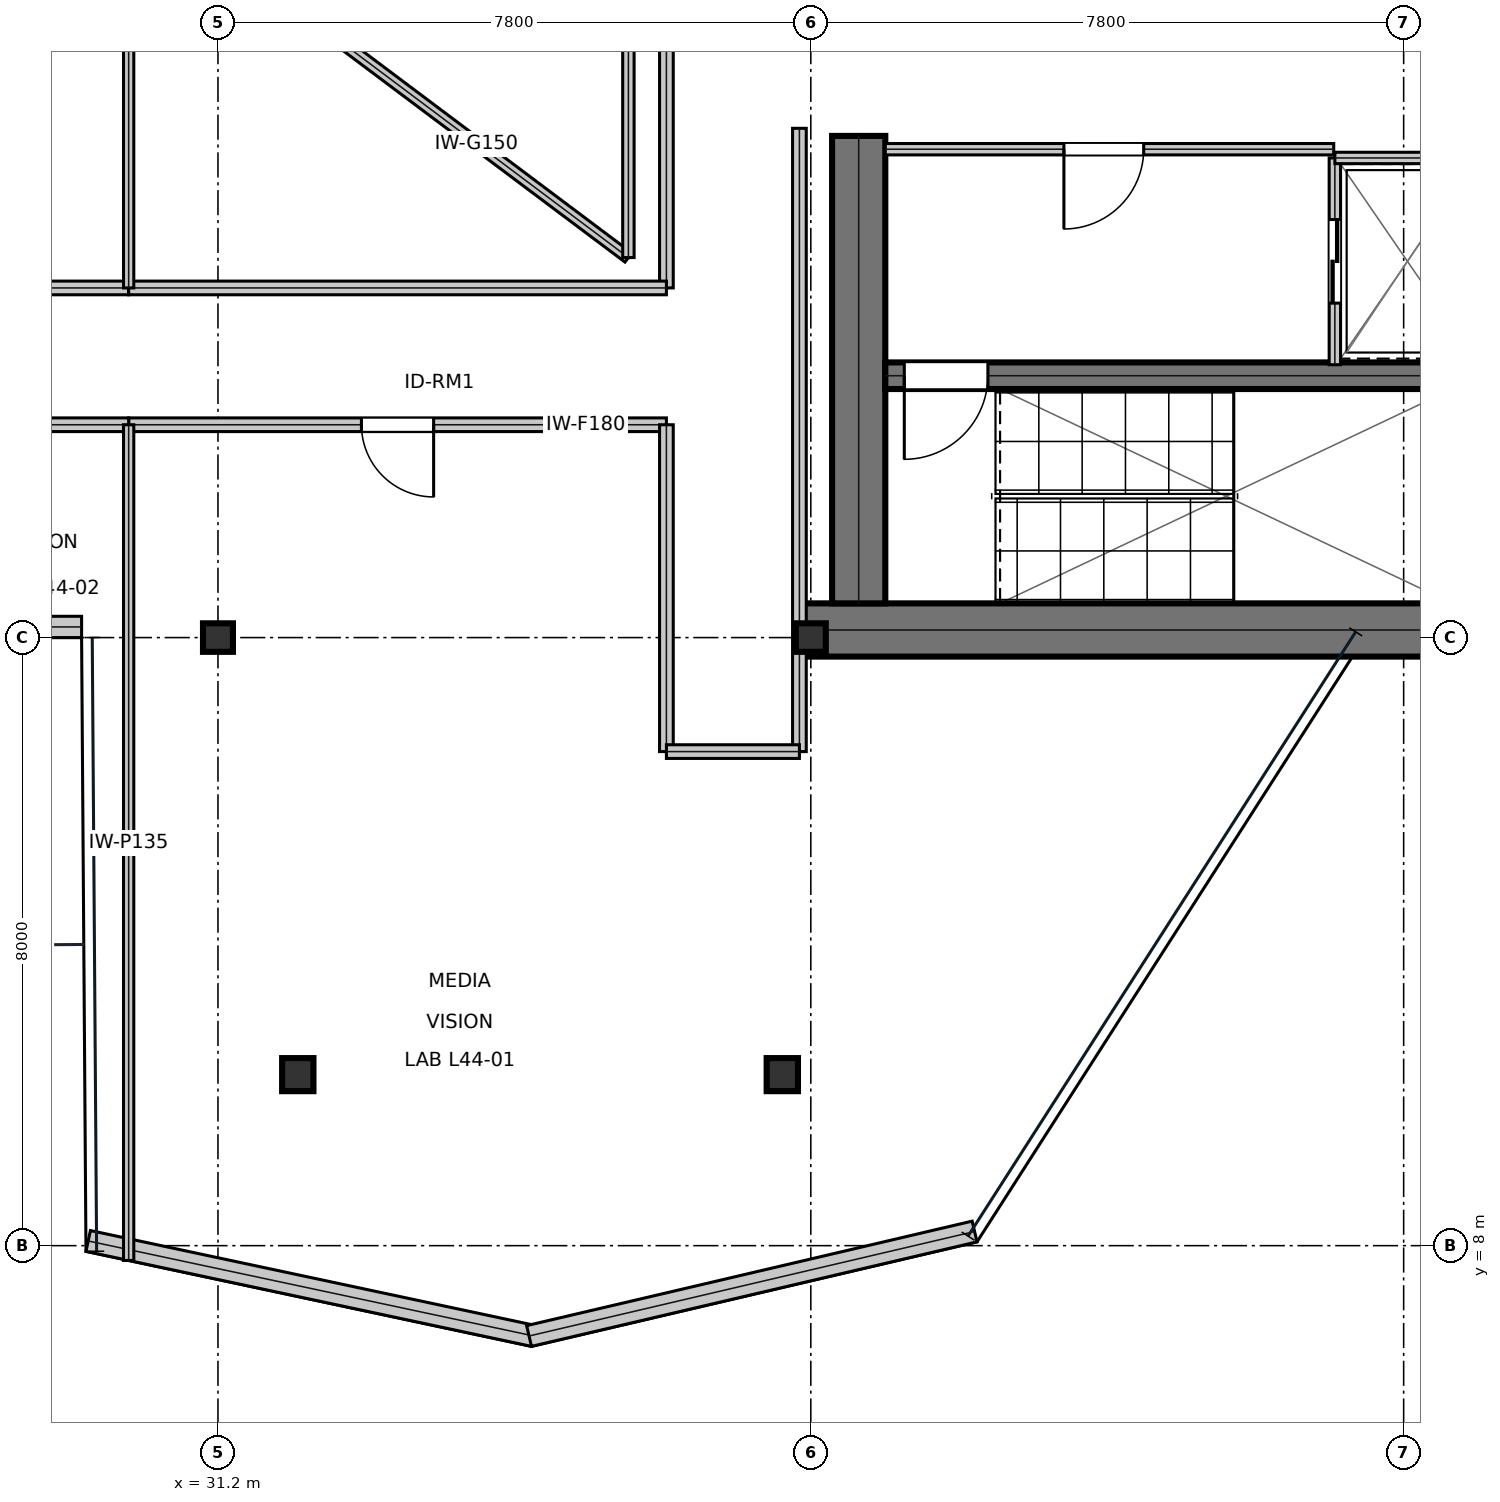
"""IFC4 building model, lengths in metres.
Left out: names, types, materials, properties, quantities, classifications, styles, units other than length and angle.
Written with IfcOpenShell. Run it as: python <this file> out.ifc"""

import sys

from ifc_helpers import new_model, si_unit, direction, frame, frame_2d, origin, origin_2d, place, context, subcontext, project, spatial, rectangle, i_section, extrude, element, fill, save


model = new_model("IFC4")
c1 = context("Model", 3, precision=1e-05, world=origin(), true_north=direction((0.0, 1.0)))
c2 = subcontext(c1, "Body", "Model", "MODEL_VIEW")
j1 = project(units=[si_unit("LENGTHUNIT", "METRE"), si_unit("PLANEANGLEUNIT", "RADIAN")], contexts=[c1])
p1 = place(None, origin())
s1 = spatial("IfcSite", under=j1, at=p1, CompositionType="ELEMENT")
p2 = place(p1, origin())
s2 = spatial("IfcBuilding", under=s1, at=p2, CompositionType="ELEMENT")
p3 = place(p2, frame((0.0, 0.0, 191.85)))
s3 = spatial("IfcBuildingStorey", under=s2, at=p3, CompositionType="ELEMENT", Elevation=191.85)
p4 = place(p3, frame((38.8, 16.1, 0.0), z_axis=(0.0, 0.0, 1.0), x_axis=(1.0, 0.0, 0.0)))
e1 = element("IfcWall", 1, at=p4, inside=s3, PredefinedType="SHEAR", context=c2, shape_type="SweptSolid", body=[
    extrude(rectangle(XDim=16.0, YDim=0.7, at=frame_2d((8.0, 0.0))), origin(), (0.0, 0.0, 1.0), 3.79),
])
p5 = place(p3, frame((39.63, 16.45, 0.0), z_axis=(0.0, 0.0, 1.0), x_axis=(0.0, 1.0, 0.0)))
e2 = element("IfcWall", 2, at=p5, inside=s3, PredefinedType="SHEAR", context=c2, shape_type="SweptSolid", body=[
    extrude(rectangle(XDim=6.15, YDim=0.7, at=frame_2d((3.075, 0.0))), origin(), (0.0, 0.0, 1.0), 3.79),
])
p6 = place(p3, frame((39.98, 19.445, 0.0), z_axis=(0.0, 0.0, 1.0), x_axis=(1.0, 0.0, 0.0)))
e3 = element("IfcWall", 3, at=p6, inside=s3, PredefinedType="SHEAR", context=c2, shape_type="SweptSolid", body=[
    extrude(rectangle(XDim=7.71, YDim=0.35, at=frame_2d((3.855, 0.0))), origin(), (0.0, 0.0, 1.0), 3.79),
])
p7 = place(p6, frame((0.25, 0.0, 0.0)))
e4 = element("IfcOpeningElement", 4, at=p7, cuts=e3, PredefinedType="OPENING", context=c2, shape_type="SweptSolid", body=[
    extrude(rectangle(XDim=1.1, YDim=2.15, at=frame_2d((0.55, 1.075))), frame((0.0, 0.185, 0.0), z_axis=(0.0, -1.0, 0.0), x_axis=(1.0, 0.0, 0.0)), (0.0, 0.0, 1.0), 0.37),
])
for number, where, z_axis, x_axis in (
    (5, (31.2, 16.0, 0.0), (0.0, 0.0, 1.0), (1.0, 0.0, 0.0)),
    (6, (39.0, 16.0, 0.0), (0.0, 0.0, 1.0), (1.0, 0.0, 0.0)),
):
    element("IfcColumn", number, at=place(p3, frame(where, z_axis=z_axis, x_axis=x_axis)), inside=s3, PredefinedType="COLUMN", context=c2, shape_type="SweptSolid", body=[
        extrude(i_section(OverallWidth=0.394, OverallDepth=0.375, WebThickness=0.017, FlangeThickness=0.028, at=origin_2d()), origin(), (0.0, 0.0, 1.0), 4.044),
    ])
for number, where, z_axis, x_axis in (
    (7, (32.25, 10.25, 0.016), (0.0, 0.0, 1.0), (1.0, 0.0, 0.0)),
    (8, (38.625, 10.25, 0.016), (0.0, 0.0, 1.0), (1.0, 0.0, 0.0)),
):
    element("IfcColumn", number, at=place(p3, frame(where, z_axis=z_axis, x_axis=x_axis)), inside=s3, PredefinedType="COLUMN", context=c2, shape_type="SweptSolid", body=[
        extrude(i_section(OverallWidth=0.412, OverallDepth=0.435, WebThickness=0.036, FlangeThickness=0.058, at=origin_2d()), origin(), (0.0, 0.0, 1.0), 4.018),
    ])
p8 = place(p3, frame((26.6, 16.14, 0.0), z_axis=(0.0, 0.0, 1.0), x_axis=(1.0, 0.0, 0.0)))
e9 = element("IfcWall", 9, at=p8, inside=s3, PredefinedType="STANDARD", context=c2, shape_type="SweptSolid", body=[
    extrude(rectangle(XDim=2.806, YDim=0.28, at=frame_2d((1.403, 0.0))), origin(), (0.0, 0.0, 1.0), 3.79),
])
p9 = place(p3, frame((29.492, 8.062, 0.0), z_axis=(0.0, 0.0, 1.0), x_axis=(0.978010564176, -0.208555355626, 0.0)))
e10 = element("IfcWall", 10, at=p9, inside=s3, PredefinedType="STANDARD", context=c2, shape_type="SweptSolid", body=[
    extrude(rectangle(XDim=5.994, YDim=0.28, at=frame_2d((2.997, 0.0))), origin(), (0.0, 0.0, 1.0), 3.79),
])
p10 = place(p3, frame((35.293, 6.811, 0.0), z_axis=(0.0, 0.0, 1.0), x_axis=(0.973574347184, 0.228370292517, 0.0)))
e11 = element("IfcWall", 11, at=p10, inside=s3, PredefinedType="STANDARD", context=c2, shape_type="SweptSolid", body=[
    extrude(rectangle(XDim=6.021, YDim=0.28, at=frame_2d((3.01, 0.0))), origin(), (0.0, 0.0, 1.0), 3.79),
])
p11 = place(p3, frame((39.98, 22.425, 0.0), z_axis=(0.0, 0.0, 1.0), x_axis=(1.0, 0.0, 0.0)))
e12 = element("IfcWall", 12, at=p11, inside=s3, PredefinedType="PARTITIONING", context=c2, shape_type="SweptSolid", body=[
    extrude(rectangle(XDim=5.9, YDim=0.15, at=frame_2d((2.95, 0.0))), origin(), (0.0, 0.0, 1.0), 3.79),
])
p12 = place(p11, frame((2.35, 0.0, 0.0)))
e13 = element("IfcOpeningElement", 13, at=p12, cuts=e12, PredefinedType="OPENING", context=c2, shape_type="SweptSolid", body=[
    extrude(rectangle(XDim=1.05, YDim=2.15, at=frame_2d((0.525, 1.075))), frame((0.0, 0.085, 0.0), z_axis=(0.0, -1.0, 0.0), x_axis=(1.0, 0.0, 0.0)), (0.0, 0.0, 1.0), 0.17),
])
p13 = place(p3, frame((45.895, 19.59, 0.0), z_axis=(0.0, 0.0, 1.0), x_axis=(0.0, 1.0, 0.0)))
e14 = element("IfcWall", 14, at=p13, inside=s3, PredefinedType="PARTITIONING", context=c2, shape_type="SweptSolid", body=[
    extrude(rectangle(XDim=2.72, YDim=0.15, at=frame_2d((1.36, 0.0))), origin(), (0.0, 0.0, 1.0), 3.79),
])
p14 = place(p13, frame((0.81, 0.0, 0.0)))
e15 = element("IfcOpeningElement", 15, at=p14, cuts=e14, PredefinedType="OPENING", context=c2, shape_type="SweptSolid", body=[
    extrude(rectangle(XDim=1.1, YDim=2.15, at=frame_2d((0.55, 1.075))), frame((0.0, 0.085, 0.0), z_axis=(0.0, -1.0, 0.0), x_axis=(1.0, 0.0, 0.0)), (0.0, 0.0, 1.0), 0.17),
])
p15 = place(p3, frame((45.895, 22.31, 0.0), z_axis=(0.0, 0.0, 1.0), x_axis=(1.0, 0.0, 0.0)))
e16 = element("IfcWall", 16, at=p15, inside=s3, PredefinedType="PARTITIONING", context=c2, shape_type="SweptSolid", body=[
    extrude(rectangle(XDim=1.915, YDim=0.15, at=frame_2d((0.958, 0.0))), origin(), (0.0, 0.0, 1.0), 3.79),
])
p16 = place(p3, frame((30.025, 18.8, 0.0), z_axis=(0.0, 0.0, 1.0), x_axis=(1.0, 0.0, 0.0)))
e17 = element("IfcWall", 17, at=p16, inside=s3, PredefinedType="SOLIDWALL", context=c2, shape_type="SweptSolid", body=[
    extrude(rectangle(XDim=7.075, YDim=0.18, at=frame_2d((3.538, 0.0))), origin(), (0.0, 0.0, 1.0), 3.241),
])
p17 = place(p16, frame((3.062, 0.0, 0.0)))
e18 = element("IfcOpeningElement", 18, at=p17, cuts=e17, PredefinedType="OPENING", context=c2, shape_type="SweptSolid", body=[
    extrude(rectangle(XDim=0.95, YDim=2.15, at=frame_2d((0.475, 1.075))), frame((0.0, 0.1, 0.0), z_axis=(0.0, -1.0, 0.0), x_axis=(1.0, 0.0, 0.0)), (0.0, 0.0, 1.0), 0.2),
])
p18 = place(p3, frame((26.4, 18.8, 0.0), z_axis=(0.0, 0.0, 1.0), x_axis=(1.0, 0.0, 0.0)))
e19 = element("IfcWall", 19, at=p18, inside=s3, PredefinedType="SOLIDWALL", context=c2, shape_type="SweptSolid", body=[
    extrude(rectangle(XDim=3.625, YDim=0.18, at=frame_2d((1.812, 0.0))), origin(), (0.0, 0.0, 1.0), 3.79),
])
p19 = place(p18, frame((1.337, 0.0, 0.0)))
e20 = element("IfcOpeningElement", 20, at=p19, cuts=e19, PredefinedType="OPENING", context=c2, shape_type="SweptSolid", body=[
    extrude(rectangle(XDim=0.95, YDim=2.15, at=frame_2d((0.475, 1.075))), frame((0.0, 0.1, 0.0), z_axis=(0.0, -1.0, 0.0), x_axis=(1.0, 0.0, 0.0)), (0.0, 0.0, 1.0), 0.2),
])
p20 = place(p3, frame((37.1, 20.6, 0.0), z_axis=(0.0, 0.0, 1.0), x_axis=(0.0, 1.0, 0.0)))
e21 = element("IfcWall", 21, at=p20, inside=s3, PredefinedType="SOLIDWALL", context=c2, shape_type="SweptSolid", body=[
    extrude(rectangle(XDim=12.9, YDim=0.18, at=frame_2d((6.45, 0.0))), origin(), (0.0, 0.0, 1.0), 3.241),
])
p21 = place(p20, frame((7.415, 0.0, 0.0)))
e22 = element("IfcOpeningElement", 22, at=p21, cuts=e21, PredefinedType="OPENING", context=c2, shape_type="SweptSolid", body=[
    extrude(rectangle(XDim=0.95, YDim=2.15, at=frame_2d((0.475, 1.075))), frame((0.0, 0.1, 0.0), z_axis=(0.0, -1.0, 0.0), x_axis=(1.0, 0.0, 0.0)), (0.0, 0.0, 1.0), 0.2),
])
p22 = place(p3, frame((38.85, 14.5, 0.0), z_axis=(0.0, 0.0, 1.0), x_axis=(0.0, 1.0, 0.0)))
e23 = element("IfcWall", 23, at=p22, inside=s3, PredefinedType="SOLIDWALL", context=c2, shape_type="SweptSolid", body=[
    extrude(rectangle(XDim=8.2, YDim=0.18, at=frame_2d((4.1, 0.0))), origin(), (0.0, 0.0, 1.0), 3.241),
])
p23 = place(p3, frame((37.1, 14.5, 0.0), z_axis=(0.0, 0.0, 1.0), x_axis=(0.0, 1.0, 0.0)))
e24 = element("IfcWall", 24, at=p23, inside=s3, PredefinedType="SOLIDWALL", context=c2, shape_type="SweptSolid", body=[
    extrude(rectangle(XDim=4.3, YDim=0.18, at=frame_2d((2.15, 0.0))), origin(), (0.0, 0.0, 1.0), 3.241),
])
p24 = place(p3, frame((37.1, 14.5, 0.0), z_axis=(0.0, 0.0, 1.0), x_axis=(1.0, 0.0, 0.0)))
e25 = element("IfcWall", 25, at=p24, inside=s3, PredefinedType="SOLIDWALL", context=c2, shape_type="SweptSolid", body=[
    extrude(rectangle(XDim=1.75, YDim=0.18, at=frame_2d((0.875, 0.0))), origin(), (0.0, 0.0, 1.0), 3.241),
])
p25 = place(p3, frame((26.4, 20.6, 0.0), z_axis=(0.0, 0.0, 1.0), x_axis=(1.0, 0.0, 0.0)))
e26 = element("IfcWall", 26, at=p25, inside=s3, PredefinedType="SOLIDWALL", context=c2, shape_type="SweptSolid", body=[
    extrude(rectangle(XDim=3.625, YDim=0.18, at=frame_2d((1.812, 0.0))), origin(), (0.0, 0.0, 1.0), 3.79),
])
p26 = place(p3, frame((30.025, 20.6, 0.0), z_axis=(0.0, 0.0, 1.0), x_axis=(1.0, 0.0, 0.0)))
e27 = element("IfcWall", 27, at=p26, inside=s3, PredefinedType="SOLIDWALL", context=c2, shape_type="SweptSolid", body=[
    extrude(rectangle(XDim=7.075, YDim=0.18, at=frame_2d((3.538, 0.0))), origin(), (0.0, 0.0, 1.0), 3.241),
])
p27 = place(p3, frame((30.025, 7.805, 0.0), z_axis=(0.0, 0.0, 1.0), x_axis=(0.0, 1.0, 0.0)))
e28 = element("IfcWall", 28, at=p27, inside=s3, PredefinedType="PARTITIONING", context=c2, shape_type="SweptSolid", body=[
    extrude(rectangle(XDim=10.995, YDim=0.135, at=frame_2d((5.498, 0.0))), origin(), (0.0, 0.0, 1.0), 3.319),
])
p28 = place(p3, frame((30.025, 20.6, 0.0), z_axis=(0.0, 0.0, 1.0), x_axis=(0.0, 1.0, 0.0)))
e29 = element("IfcWall", 29, at=p28, inside=s3, PredefinedType="PARTITIONING", context=c2, shape_type="SweptSolid", body=[
    extrude(rectangle(XDim=19.595, YDim=0.135, at=frame_2d((9.797, 0.0))), origin(), (0.0, 0.0, 1.0), 3.241),
])
p29 = place(p3, frame((32.6, 24.0, 0.0), z_axis=(0.0, 0.0, 1.0), x_axis=(0.8, -0.6, 0.0)))
e30 = element("IfcWall", 30, at=p29, inside=s3, PredefinedType="MOVABLE", context=c2, shape_type="SweptSolid", body=[
    extrude(rectangle(XDim=5.0, YDim=0.15, at=frame_2d((2.5, 0.0))), origin(), (0.0, 0.0, 1.0), 3.79),
])
p30 = place(p3, frame((36.6, 21.0, 0.0), z_axis=(0.0, 0.0, 1.0), x_axis=(0.0, 1.0, 0.0)))
e31 = element("IfcWall", 31, at=p30, inside=s3, PredefinedType="MOVABLE", context=c2, shape_type="SweptSolid", body=[
    extrude(rectangle(XDim=6.0, YDim=0.15, at=frame_2d((3.0, 0.0))), origin(), (0.0, 0.0, 1.0), 3.79),
])
p31 = place(p12, frame((1.05, 0.0, 0.0), z_axis=(0.0, 0.0, 1.0), x_axis=(-1.0, 0.0, 0.0)))
e32 = element("IfcDoor", 32, at=p31, inside=s3, OperationType="SINGLE_SWING_RIGHT", PredefinedType="DOOR", context=c2, shape_type="SweptSolid", body=[
    extrude(rectangle(XDim=1.05, YDim=2.15, at=frame_2d((0.525, 1.075))), frame((0.0, 0.025, 0.0), z_axis=(0.0, -1.0, 0.0), x_axis=(1.0, 0.0, 0.0)), (0.0, 0.0, 1.0), 0.05),
])
fill(e13, e32)
p32 = place(p14, frame((1.1, 0.0, 0.0), z_axis=(0.0, 0.0, 1.0), x_axis=(-1.0, 0.0, 0.0)))
e33 = element("IfcDoor", 33, at=p32, inside=s3, OperationType="DOUBLE_DOOR_SLIDING", PredefinedType="DOOR", context=c2, shape_type="SweptSolid", body=[
    extrude(rectangle(XDim=1.1, YDim=2.15, at=frame_2d((0.55, 1.075))), frame((0.0, 0.025, 0.0), z_axis=(0.0, -1.0, 0.0), x_axis=(1.0, 0.0, 0.0)), (0.0, 0.0, 1.0), 0.05),
])
fill(e15, e33)
p33 = place(p17, frame((0.95, 0.0, 0.0), z_axis=(0.0, 0.0, 1.0), x_axis=(-1.0, 0.0, 0.0)))
e34 = element("IfcDoor", 34, at=p33, inside=s3, OperationType="SINGLE_SWING_LEFT", PredefinedType="DOOR", context=c2, shape_type="SweptSolid", body=[
    extrude(rectangle(XDim=0.95, YDim=2.15, at=frame_2d((0.475, 1.075))), frame((0.0, 0.025, 0.0), z_axis=(0.0, -1.0, 0.0), x_axis=(1.0, 0.0, 0.0)), (0.0, 0.0, 1.0), 0.05),
])
fill(e18, e34)
p34 = place(p7, frame((1.1, 0.0, 0.0), z_axis=(0.0, 0.0, 1.0), x_axis=(-1.0, 0.0, 0.0)))
e35 = element("IfcDoor", 35, at=p34, inside=s3, OperationType="SINGLE_SWING_RIGHT", PredefinedType="DOOR", context=c2, shape_type="SweptSolid", body=[
    extrude(rectangle(XDim=1.1, YDim=2.15, at=frame_2d((0.55, 1.075))), frame((0.0, 0.025, 0.0), z_axis=(0.0, -1.0, 0.0), x_axis=(1.0, 0.0, 0.0)), (0.0, 0.0, 1.0), 0.05),
])
fill(e4, e35)
save(model, sys.argv[1])
